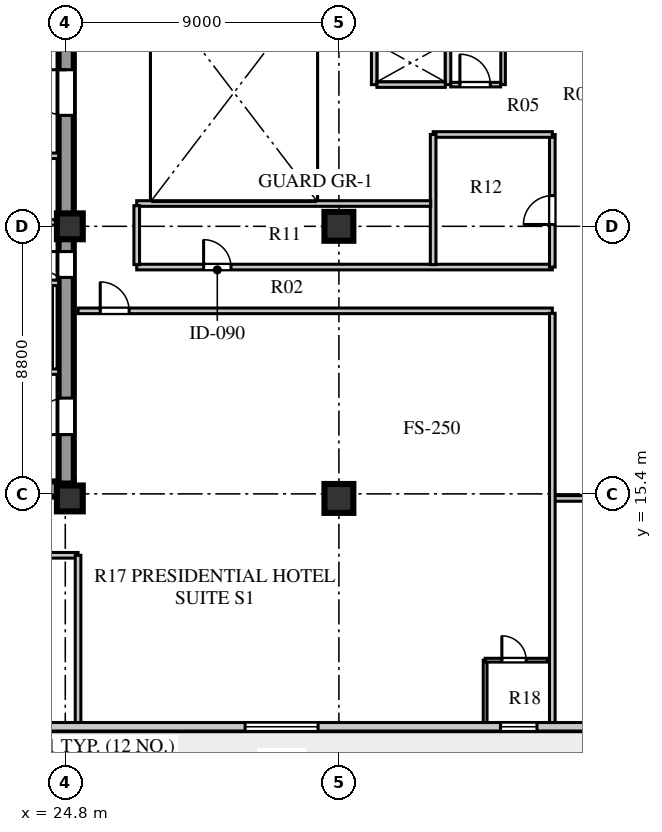
"""IFC4 building model, lengths in metres.
Left out: names, types, materials, properties, quantities, classifications, styles, units other than length and angle.
Written with IfcOpenShell. Run it as: python <this file> out.ifc"""

import sys

from ifc_helpers import new_model, si_unit, direction, frame, frame_2d, origin, origin_2d, place, context, subcontext, project, spatial, rectangle, extrude, element, fill, save


model = new_model("IFC4")
c1 = context("Model", 3, precision=1e-05, world=origin(), true_north=direction((0.0, 1.0)))
c2 = subcontext(c1, "Body", "Model", "MODEL_VIEW")
j1 = project(units=[si_unit("LENGTHUNIT", "METRE"), si_unit("PLANEANGLEUNIT", "RADIAN")], contexts=[c1])
p1 = place(None, origin())
s1 = spatial("IfcSite", under=j1, at=p1, CompositionType="ELEMENT")
p2 = place(p1, origin())
s2 = spatial("IfcBuilding", under=s1, at=p2, CompositionType="ELEMENT")
p3 = place(p2, frame((0.0, 0.0, 157.9)))
s3 = spatial("IfcBuildingStorey", under=s2, at=p3, CompositionType="ELEMENT", Elevation=157.9)
p4 = place(p3, frame((15.4, 15.56, 0.0), z_axis=(0.0, 0.0, 1.0), x_axis=(1.0, 0.0, 0.0)))
e1 = element("IfcWall", 1, at=p4, inside=s3, PredefinedType="SHEAR", context=c2, shape_type="SweptSolid", body=[
    extrude(rectangle(XDim=9.68, YDim=0.5, at=frame_2d((4.84, 0.0))), origin(), (0.0, 0.0, 1.0), 3.6),
])
p5 = place(p3, frame((24.83, 15.74, 0.0), z_axis=(0.0, 0.0, 1.0), x_axis=(0.0, 1.0, 0.0)))
e2 = element("IfcWall", 2, at=p5, inside=s3, PredefinedType="SHEAR", context=c2, shape_type="SweptSolid", body=[
    extrude(rectangle(XDim=25.76, YDim=0.5, at=frame_2d((12.88, 0.0))), origin(), (0.0, 0.0, 1.0), 3.6),
])
p6 = place(p5, frame((1.61, 0.0, 0.0)))
e3 = element("IfcOpeningElement", 3, at=p6, cuts=e2, PredefinedType="OPENING", context=c2, shape_type="SweptSolid", body=[
    extrude(rectangle(XDim=1.2, YDim=2.1, at=frame_2d((0.6, 1.05))), frame((0.0, 0.26, 0.0), z_axis=(0.0, -1.0, 0.0), x_axis=(1.0, 0.0, 0.0)), (0.0, 0.0, 1.0), 0.52),
])
p7 = place(p5, frame((6.78, 0.0, 0.0)))
e4 = element("IfcOpeningElement", 4, at=p7, cuts=e2, PredefinedType="OPENING", context=c2, shape_type="SweptSolid", body=[
    extrude(rectangle(XDim=0.85, YDim=2.06, at=frame_2d((0.425, 1.03))), frame((0.0, 0.26, 0.0), z_axis=(0.0, -1.0, 0.0), x_axis=(1.0, 0.0, 0.0)), (0.0, 0.0, 1.0), 0.52),
])
p8 = place(p5, frame((12.11, 0.0, 0.0)))
e5 = element("IfcOpeningElement", 5, at=p8, cuts=e2, PredefinedType="OPENING", context=c2, shape_type="SweptSolid", body=[
    extrude(rectangle(XDim=1.5, YDim=2.12, at=frame_2d((0.75, 1.06))), frame((0.0, 0.26, 0.0), z_axis=(0.0, -1.0, 0.0), x_axis=(1.0, 0.0, 0.0)), (0.0, 0.0, 1.0), 0.52),
])
p9 = place(p5, frame((20.11, 0.0, 0.0)))
e6 = element("IfcOpeningElement", 6, at=p9, cuts=e2, PredefinedType="OPENING", context=c2, shape_type="SweptSolid", body=[
    extrude(rectangle(XDim=1.2, YDim=2.12, at=frame_2d((0.6, 1.06))), frame((0.0, 0.26, 0.0), z_axis=(0.0, -1.0, 0.0), x_axis=(1.0, 0.0, 0.0)), (0.0, 0.0, 1.0), 0.52),
])
p10 = place(p5, frame((24.01, 0.0, 0.0)))
e7 = element("IfcOpeningElement", 7, at=p10, cuts=e2, PredefinedType="OPENING", context=c2, shape_type="SweptSolid", body=[
    extrude(rectangle(XDim=0.95, YDim=2.1, at=frame_2d((0.475, 1.05))), frame((0.0, 0.26, 0.0), z_axis=(0.0, -1.0, 0.0), x_axis=(1.0, 0.0, 0.0)), (0.0, 0.0, 1.0), 0.52),
])
for number, where, z_axis, x_axis in (
    (8, (24.95, 15.25, 0.0), (0.0, 0.0, 1.0), (1.0, 0.0, 0.0)),
    (9, (24.95, 24.2, 0.0), (0.0, 0.0, 1.0), (1.0, 0.0, 0.0)),
):
    element("IfcColumn", number, at=place(p3, frame(where, z_axis=z_axis, x_axis=x_axis)), inside=s3, PredefinedType="COLUMN", context=c2, shape_type="SweptSolid", body=[
        extrude(rectangle(XDim=0.85, YDim=0.85, at=origin_2d()), origin(), (0.0, 0.0, 1.0), 3.6),
    ])
for number, where, z_axis, x_axis in (
    (10, (33.8, 15.25, 0.0), (0.0, 0.0, 1.0), (1.0, 0.0, 0.0)),
    (11, (33.8, 24.2, 0.0), (0.0, 0.0, 1.0), (1.0, 0.0, 0.0)),
):
    element("IfcColumn", number, at=place(p3, frame(where, z_axis=z_axis, x_axis=x_axis)), inside=s3, PredefinedType="COLUMN", context=c2, shape_type="SweptSolid", body=[
        extrude(rectangle(XDim=0.95, YDim=0.95, at=origin_2d()), origin(), (0.0, 0.0, 1.0), 3.6),
    ])
p11 = place(p3, frame((13.05, 7.74, 0.0), z_axis=(0.0, 0.0, 1.0), x_axis=(1.0, 0.0, 0.0)))
e12 = element("IfcWall", 12, at=p11, inside=s3, PredefinedType="STANDARD", context=c2, shape_type="SweptSolid", body=[
    extrude(rectangle(XDim=32.5, YDim=0.28, at=frame_2d((16.25, 0.0))), origin(), (0.0, 0.0, 1.0), 3.6),
])
p12 = place(p11, frame((0.95, 0.0, 0.0)))
e13 = element("IfcOpeningElement", 13, at=p12, cuts=e12, PredefinedType="OPENING", context=c2, shape_type="SweptSolid", body=[
    extrude(rectangle(XDim=1.0, YDim=2.05, at=frame_2d((0.5, 1.025))), frame((0.0, 0.15, 0.0), z_axis=(0.0, -1.0, 0.0), x_axis=(1.0, 0.0, 0.0)), (0.0, 0.0, 1.0), 0.3),
])
p13 = place(p11, frame((6.43, 0.0, 0.8)))
e14 = element("IfcOpeningElement", 14, at=p13, cuts=e12, PredefinedType="OPENING", context=c2, shape_type="SweptSolid", body=[
    extrude(rectangle(XDim=1.2, YDim=1.75, at=frame_2d((0.6, 0.875))), frame((0.0, 0.15, 0.0), z_axis=(0.0, -1.0, 0.0), x_axis=(1.0, 0.0, 0.0)), (0.0, 0.0, 1.0), 0.3),
])
p14 = place(p11, frame((17.665, 0.0, 0.8)))
e15 = element("IfcOpeningElement", 15, at=p14, cuts=e12, PredefinedType="OPENING", context=c2, shape_type="SweptSolid", body=[
    extrude(rectangle(XDim=2.4, YDim=2.05, at=frame_2d((1.2, 1.025))), frame((0.0, 0.15, 0.0), z_axis=(0.0, -1.0, 0.0), x_axis=(1.0, 0.0, 0.0)), (0.0, 0.0, 1.0), 0.3),
])
p15 = place(p11, frame((26.065, 0.0, 0.8)))
e16 = element("IfcOpeningElement", 16, at=p15, cuts=e12, PredefinedType="OPENING", context=c2, shape_type="SweptSolid", body=[
    extrude(rectangle(XDim=1.2, YDim=1.75, at=frame_2d((0.6, 0.875))), frame((0.0, 0.15, 0.0), z_axis=(0.0, -1.0, 0.0), x_axis=(1.0, 0.0, 0.0)), (0.0, 0.0, 1.0), 0.3),
])
p16 = place(p11, frame((29.405, 0.0, 0.8)))
e17 = element("IfcOpeningElement", 17, at=p16, cuts=e12, PredefinedType="OPENING", context=c2, shape_type="SweptSolid", body=[
    extrude(rectangle(XDim=1.35, YDim=1.9, at=frame_2d((0.675, 0.95))), frame((0.0, 0.15, 0.0), z_axis=(0.0, -1.0, 0.0), x_axis=(1.0, 0.0, 0.0)), (0.0, 0.0, 1.0), 0.3),
])
p17 = place(p3, frame((19.64, 19.42, 0.0), z_axis=(0.0, 0.0, 1.0), x_axis=(1.0, 0.0, 0.0)))
e18 = element("IfcWall", 18, at=p17, inside=s3, PredefinedType="SOLIDWALL", context=c2, shape_type="SweptSolid", body=[
    extrude(rectangle(XDim=4.94, YDim=0.18, at=frame_2d((2.47, 0.0))), origin(), (0.0, 0.0, 1.0), 3.6),
])
p18 = place(p17, frame((0.72, 0.0, 0.0)))
e19 = element("IfcOpeningElement", 19, at=p18, cuts=e18, PredefinedType="OPENING", context=c2, shape_type="SweptSolid", body=[
    extrude(rectangle(XDim=1.1, YDim=2.1, at=frame_2d((0.55, 1.05))), frame((0.0, 0.1, 0.0), z_axis=(0.0, -1.0, 0.0), x_axis=(1.0, 0.0, 0.0)), (0.0, 0.0, 1.0), 0.2),
])
p19 = place(p17, frame((3.02, 0.0, 0.0)))
e20 = element("IfcOpeningElement", 20, at=p19, cuts=e18, PredefinedType="OPENING", context=c2, shape_type="SweptSolid", body=[
    extrude(rectangle(XDim=1.1, YDim=2.1, at=frame_2d((0.55, 1.05))), frame((0.0, 0.1, 0.0), z_axis=(0.0, -1.0, 0.0), x_axis=(1.0, 0.0, 0.0)), (0.0, 0.0, 1.0), 0.2),
])
p20 = place(p3, frame((19.64, 22.34, 0.0), z_axis=(0.0, 0.0, 1.0), x_axis=(1.0, 0.0, 0.0)))
e21 = element("IfcWall", 21, at=p20, inside=s3, PredefinedType="SOLIDWALL", context=c2, shape_type="SweptSolid", body=[
    extrude(rectangle(XDim=4.94, YDim=0.18, at=frame_2d((2.47, 0.0))), origin(), (0.0, 0.0, 1.0), 3.6),
])
p21 = place(p3, frame((15.9, 26.52, 0.0), z_axis=(0.0, 0.0, 1.0), x_axis=(1.0, 0.0, 0.0)))
e22 = element("IfcWall", 22, at=p21, inside=s3, PredefinedType="SOLIDWALL", context=c2, shape_type="SweptSolid", body=[
    extrude(rectangle(XDim=8.68, YDim=0.18, at=frame_2d((4.34, 0.0))), origin(), (0.0, 0.0, 1.0), 3.6),
])
p22 = place(p21, frame((2.05, 0.0, 0.0)))
e23 = element("IfcOpeningElement", 23, at=p22, cuts=e22, PredefinedType="OPENING", context=c2, shape_type="SweptSolid", body=[
    extrude(rectangle(XDim=0.85, YDim=2.06, at=frame_2d((0.425, 1.03))), frame((0.0, 0.1, 0.0), z_axis=(0.0, -1.0, 0.0), x_axis=(1.0, 0.0, 0.0)), (0.0, 0.0, 1.0), 0.2),
])
p23 = place(p21, frame((5.2, 0.0, 0.0)))
e24 = element("IfcOpeningElement", 24, at=p23, cuts=e22, PredefinedType="OPENING", context=c2, shape_type="SweptSolid", body=[
    extrude(rectangle(XDim=0.95, YDim=2.1, at=frame_2d((0.475, 1.05))), frame((0.0, 0.1, 0.0), z_axis=(0.0, -1.0, 0.0), x_axis=(1.0, 0.0, 0.0)), (0.0, 0.0, 1.0), 0.2),
])
p24 = place(p3, frame((15.9, 24.33, 0.0), z_axis=(0.0, 0.0, 1.0), x_axis=(1.0, 0.0, 0.0)))
e25 = element("IfcWall", 25, at=p24, inside=s3, PredefinedType="SOLIDWALL", context=c2, shape_type="SweptSolid", body=[
    extrude(rectangle(XDim=8.68, YDim=0.18, at=frame_2d((4.34, 0.0))), origin(), (0.0, 0.0, 1.0), 2.95),
])
p25 = place(p3, frame((34.96, 28.86, 0.0), z_axis=(0.0, 0.0, 1.0), x_axis=(0.0, 1.0, 0.0)))
e26 = element("IfcWall", 26, at=p25, inside=s3, PredefinedType="SOLIDWALL", context=c2, shape_type="SweptSolid", body=[
    extrude(rectangle(XDim=4.22, YDim=0.18, at=frame_2d((2.11, 0.0))), origin(), (0.0, 0.0, 1.0), 3.6),
])
p26 = place(p3, frame((37.39, 28.86, 0.0), z_axis=(0.0, 0.0, 1.0), x_axis=(0.0, 1.0, 0.0)))
e27 = element("IfcWall", 27, at=p26, inside=s3, PredefinedType="SOLIDWALL", context=c2, shape_type="SweptSolid", body=[
    extrude(rectangle(XDim=4.22, YDim=0.18, at=frame_2d((2.11, 0.0))), origin(), (0.0, 0.0, 1.0), 3.6),
])
p27 = place(p26, frame((2.1, 0.0, 0.0)))
e28 = element("IfcOpeningElement", 28, at=p27, cuts=e27, PredefinedType="OPENING", context=c2, shape_type="SweptSolid", body=[
    extrude(rectangle(XDim=1.2, YDim=2.12, at=frame_2d((0.6, 1.06))), frame((0.0, 0.1, 0.0), z_axis=(0.0, -1.0, 0.0), x_axis=(1.0, 0.0, 0.0)), (0.0, 0.0, 1.0), 0.2),
])
p28 = place(p3, frame((35.05, 28.86, 0.0), z_axis=(0.0, 0.0, 1.0), x_axis=(1.0, 0.0, 0.0)))
e29 = element("IfcWall", 29, at=p28, inside=s3, PredefinedType="SOLIDWALL", context=c2, shape_type="SweptSolid", body=[
    extrude(rectangle(XDim=2.25, YDim=0.18, at=frame_2d((1.125, 0.0))), origin(), (0.0, 0.0, 1.0), 3.6),
])
p29 = place(p3, frame((39.2, 28.86, 0.0), z_axis=(0.0, 0.0, 1.0), x_axis=(0.0, 1.0, 0.0)))
e30 = element("IfcWall", 30, at=p29, inside=s3, PredefinedType="PARTITIONING", context=c2, shape_type="SweptSolid", body=[
    extrude(rectangle(XDim=4.22, YDim=0.15, at=frame_2d((2.11, 0.0))), origin(), (0.0, 0.0, 1.0), 3.6),
])
p30 = place(p3, frame((37.48, 28.86, 0.0), z_axis=(0.0, 0.0, 1.0), x_axis=(1.0, 0.0, 0.0)))
e31 = element("IfcWall", 31, at=p30, inside=s3, PredefinedType="PARTITIONING", context=c2, shape_type="SweptSolid", body=[
    extrude(rectangle(XDim=1.64, YDim=0.15, at=frame_2d((0.82, 0.0))), origin(), (0.0, 0.0, 1.0), 3.6),
])
p31 = place(p30, frame((0.3, 0.0, 0.0)))
e32 = element("IfcOpeningElement", 32, at=p31, cuts=e31, PredefinedType="OPENING", context=c2, shape_type="SweptSolid", body=[
    extrude(rectangle(XDim=1.0, YDim=2.1, at=frame_2d((0.5, 1.05))), frame((0.0, 0.085, 0.0), z_axis=(0.0, -1.0, 0.0), x_axis=(1.0, 0.0, 0.0)), (0.0, 0.0, 1.0), 0.17),
])
p32 = place(p3, frame((25.22, 21.42, 0.0), z_axis=(0.0, 0.0, 1.0), x_axis=(1.0, 0.0, 0.0)))
e33 = element("IfcWall", 33, at=p32, inside=s3, PredefinedType="SOLIDWALL", context=c2, shape_type="SweptSolid", body=[
    extrude(rectangle(XDim=15.6, YDim=0.185, at=frame_2d((7.8, 0.0))), origin(), (0.0, 0.0, 1.0), 3.25),
])
p33 = place(p32, frame((0.73, 0.0, 0.0)))
e34 = element("IfcOpeningElement", 34, at=p33, cuts=e33, PredefinedType="OPENING", context=c2, shape_type="SweptSolid", body=[
    extrude(rectangle(XDim=0.95, YDim=2.1, at=frame_2d((0.475, 1.05))), frame((0.0, 0.103, 0.0), z_axis=(0.0, -1.0, 0.0), x_axis=(1.0, 0.0, 0.0)), (0.0, 0.0, 1.0), 0.205),
])
p34 = place(p3, frame((27.15, 22.86, 0.0), z_axis=(0.0, 0.0, 1.0), x_axis=(1.0, 0.0, 0.0)))
e35 = element("IfcWall", 35, at=p34, inside=s3, PredefinedType="SOLIDWALL", context=c2, shape_type="SweptSolid", body=[
    extrude(rectangle(XDim=13.67, YDim=0.185, at=frame_2d((6.835, 0.0))), origin(), (0.0, 0.0, 1.0), 3.6),
])
p35 = place(p34, frame((2.2, 0.0, 0.0)))
e36 = element("IfcOpeningElement", 36, at=p35, cuts=e35, PredefinedType="OPENING", context=c2, shape_type="SweptSolid", body=[
    extrude(rectangle(XDim=0.9, YDim=2.08, at=frame_2d((0.45, 1.04))), frame((0.0, 0.103, 0.0), z_axis=(0.0, -1.0, 0.0), x_axis=(1.0, 0.0, 0.0)), (0.0, 0.0, 1.0), 0.205),
])
p36 = place(p3, frame((40.82, 15.25, 0.0), z_axis=(0.0, 0.0, 1.0), x_axis=(1.0, 0.0, 0.0)))
e37 = element("IfcWall", 37, at=p36, inside=s3, PredefinedType="SOLIDWALL", context=c2, shape_type="SweptSolid", body=[
    extrude(rectangle(XDim=9.7, YDim=0.185, at=frame_2d((4.85, 0.0))), origin(), (0.0, 0.0, 1.0), 2.95),
])
p37 = place(p3, frame((40.82, 22.86, 0.0), z_axis=(0.0, 0.0, 1.0), x_axis=(0.0, 1.0, 0.0)))
e38 = element("IfcWall", 38, at=p37, inside=s3, PredefinedType="SOLIDWALL", context=c2, shape_type="SweptSolid", body=[
    extrude(rectangle(XDim=4.36, YDim=0.185, at=frame_2d((2.18, 0.0))), origin(), (0.0, 0.0, 1.0), 3.6),
])
p38 = place(p37, frame((1.4, 0.0, 0.0)))
e39 = element("IfcOpeningElement", 39, at=p38, cuts=e38, PredefinedType="OPENING", context=c2, shape_type="SweptSolid", body=[
    extrude(rectangle(XDim=0.95, YDim=2.1, at=frame_2d((0.475, 1.05))), frame((0.0, 0.103, 0.0), z_axis=(0.0, -1.0, 0.0), x_axis=(1.0, 0.0, 0.0)), (0.0, 0.0, 1.0), 0.205),
])
p39 = place(p3, frame((13.39, 13.38, 0.0), z_axis=(0.0, 0.0, 1.0), x_axis=(1.0, 0.0, 0.0)))
e40 = element("IfcWall", 40, at=p39, inside=s3, PredefinedType="SOLIDWALL", context=c2, shape_type="SweptSolid", body=[
    extrude(rectangle(XDim=11.83, YDim=0.185, at=frame_2d((5.915, 0.0))), origin(), (0.0, 0.0, 1.0), 3.6),
])
p40 = place(p39, frame((4.76, 0.0, 0.0)))
e41 = element("IfcOpeningElement", 41, at=p40, cuts=e40, PredefinedType="OPENING", context=c2, shape_type="SweptSolid", body=[
    extrude(rectangle(XDim=1.0, YDim=2.08, at=frame_2d((0.5, 1.04))), frame((0.0, 0.103, 0.0), z_axis=(0.0, -1.0, 0.0), x_axis=(1.0, 0.0, 0.0)), (0.0, 0.0, 1.0), 0.205),
])
p41 = place(p3, frame((25.22, 7.88, 0.0), z_axis=(0.0, 0.0, 1.0), x_axis=(0.0, 1.0, 0.0)))
e42 = element("IfcWall", 42, at=p41, inside=s3, PredefinedType="SOLIDWALL", context=c2, shape_type="SweptSolid", body=[
    extrude(rectangle(XDim=5.5, YDim=0.185, at=frame_2d((2.75, 0.0))), origin(), (0.0, 0.0, 1.0), 3.15),
])
p42 = place(p3, frame((36.9, 27.22, 0.0), z_axis=(0.0, 0.0, 1.0), x_axis=(1.0, 0.0, 0.0)))
e43 = element("IfcWall", 43, at=p42, inside=s3, PredefinedType="SOLIDWALL", context=c2, shape_type="SweptSolid", body=[
    extrude(rectangle(XDim=3.92, YDim=0.185, at=frame_2d((1.96, 0.0))), origin(), (0.0, 0.0, 1.0), 3.25),
])
p43 = place(p3, frame((36.9, 22.94, 0.0), z_axis=(0.0, 0.0, 1.0), x_axis=(0.0, 1.0, 0.0)))
e44 = element("IfcWall", 44, at=p43, inside=s3, PredefinedType="SOLIDWALL", context=c2, shape_type="SweptSolid", body=[
    extrude(rectangle(XDim=4.28, YDim=0.185, at=frame_2d((2.14, 0.0))), origin(), (0.0, 0.0, 1.0), 3.6),
])
p44 = place(p3, frame((27.15, 24.95, 0.0), z_axis=(0.0, 0.0, 1.0), x_axis=(1.0, 0.0, 0.0)))
e45 = element("IfcWall", 45, at=p44, inside=s3, PredefinedType="SOLIDWALL", context=c2, shape_type="SweptSolid", body=[
    extrude(rectangle(XDim=9.67, YDim=0.185, at=frame_2d((4.835, 0.0))), origin(), (0.0, 0.0, 1.0), 3.05),
])
p45 = place(p3, frame((27.15, 22.94, 0.0), z_axis=(0.0, 0.0, 1.0), x_axis=(0.0, 1.0, 0.0)))
e46 = element("IfcWall", 46, at=p45, inside=s3, PredefinedType="SOLIDWALL", context=c2, shape_type="SweptSolid", body=[
    extrude(rectangle(XDim=1.94, YDim=0.185, at=frame_2d((0.97, 0.0))), origin(), (0.0, 0.0, 1.0), 3.6),
])
p46 = place(p3, frame((40.82, 7.88, 0.0), z_axis=(0.0, 0.0, 1.0), x_axis=(0.0, 1.0, 0.0)))
e47 = element("IfcWall", 47, at=p46, inside=s3, PredefinedType="SOLIDWALL", context=c2, shape_type="SweptSolid", body=[
    extrude(rectangle(XDim=13.46, YDim=0.185, at=frame_2d((6.73, 0.0))), origin(), (0.0, 0.0, 1.0), 3.6),
])
p47 = place(p3, frame((38.61, 7.88, 0.0), z_axis=(0.0, 0.0, 1.0), x_axis=(0.0, 1.0, 0.0)))
e48 = element("IfcWall", 48, at=p47, inside=s3, PredefinedType="PLUMBINGWALL", context=c2, shape_type="SweptSolid", body=[
    extrude(rectangle(XDim=2.05, YDim=0.125, at=frame_2d((1.025, 0.0))), origin(), (0.0, 0.0, 1.0), 3.6),
])
p48 = place(p3, frame((38.61, 9.93, 0.0), z_axis=(0.0, 0.0, 1.0), x_axis=(1.0, 0.0, 0.0)))
e49 = element("IfcWall", 49, at=p48, inside=s3, PredefinedType="PLUMBINGWALL", context=c2, shape_type="SweptSolid", body=[
    extrude(rectangle(XDim=2.05, YDim=0.125, at=frame_2d((1.025, 0.0))), origin(), (0.0, 0.0, 1.0), 3.6),
])
p49 = place(p48, frame((0.55, 0.0, 0.0)))
e50 = element("IfcOpeningElement", 50, at=p49, cuts=e49, PredefinedType="OPENING", context=c2, shape_type="SweptSolid", body=[
    extrude(rectangle(XDim=0.8, YDim=2.05, at=frame_2d((0.4, 1.025))), frame((0.0, 0.073, 0.0), z_axis=(0.0, -1.0, 0.0), x_axis=(1.0, 0.0, 0.0)), (0.0, 0.0, 1.0), 0.145),
])
p50 = place(p14, origin())
e51 = element("IfcWindow", 51, at=p50, inside=s3, PartitioningType="SINGLE_PANEL", PredefinedType="WINDOW", context=c2, shape_type="SweptSolid", body=[
    extrude(rectangle(XDim=2.4, YDim=2.05, at=frame_2d((1.2, 1.025))), frame((0.0, 0.03, 0.0), z_axis=(0.0, -1.0, 0.0), x_axis=(1.0, 0.0, 0.0)), (0.0, 0.0, 1.0), 0.06),
])
fill(e15, e51)
p51 = place(p15, origin())
e52 = element("IfcWindow", 52, at=p51, inside=s3, PartitioningType="SINGLE_PANEL", PredefinedType="WINDOW", context=c2, shape_type="SweptSolid", body=[
    extrude(rectangle(XDim=1.2, YDim=1.75, at=frame_2d((0.6, 0.875))), frame((0.0, 0.03, 0.0), z_axis=(0.0, -1.0, 0.0), x_axis=(1.0, 0.0, 0.0)), (0.0, 0.0, 1.0), 0.06),
])
fill(e16, e52)
p52 = place(p6, frame((1.2, 0.0, 0.0), z_axis=(0.0, 0.0, 1.0), x_axis=(-1.0, 0.0, 0.0)))
e53 = element("IfcDoor", 53, at=p52, inside=s3, OperationType="SINGLE_SWING_RIGHT", PredefinedType="DOOR", context=c2, shape_type="SweptSolid", body=[
    extrude(rectangle(XDim=1.2, YDim=2.1, at=frame_2d((0.6, 1.05))), frame((0.0, 0.025, 0.0), z_axis=(0.0, -1.0, 0.0), x_axis=(1.0, 0.0, 0.0)), (0.0, 0.0, 1.0), 0.05),
])
fill(e3, e53)
p53 = place(p7, frame((0.85, 0.0, 0.0), z_axis=(0.0, 0.0, 1.0), x_axis=(-1.0, 0.0, 0.0)))
e54 = element("IfcDoor", 54, at=p53, inside=s3, OperationType="SINGLE_SWING_LEFT", PredefinedType="DOOR", context=c2, shape_type="SweptSolid", body=[
    extrude(rectangle(XDim=0.85, YDim=2.06, at=frame_2d((0.425, 1.03))), frame((0.0, 0.025, 0.0), z_axis=(0.0, -1.0, 0.0), x_axis=(1.0, 0.0, 0.0)), (0.0, 0.0, 1.0), 0.05),
])
fill(e4, e54)
p54 = place(p8, frame((1.5, 0.0, 0.0), z_axis=(0.0, 0.0, 1.0), x_axis=(-1.0, 0.0, 0.0)))
e55 = element("IfcDoor", 55, at=p54, inside=s3, OperationType="SINGLE_SWING_LEFT", PredefinedType="DOOR", context=c2, shape_type="SweptSolid", body=[
    extrude(rectangle(XDim=1.5, YDim=2.12, at=frame_2d((0.75, 1.06))), frame((0.0, 0.025, 0.0), z_axis=(0.0, -1.0, 0.0), x_axis=(1.0, 0.0, 0.0)), (0.0, 0.0, 1.0), 0.05),
])
fill(e5, e55)
p55 = place(p31, origin())
e56 = element("IfcDoor", 56, at=p55, inside=s3, OperationType="SINGLE_SWING_LEFT", PredefinedType="DOOR", context=c2, shape_type="SweptSolid", body=[
    extrude(rectangle(XDim=1.0, YDim=2.1, at=frame_2d((0.5, 1.05))), frame((0.0, 0.025, 0.0), z_axis=(0.0, -1.0, 0.0), x_axis=(1.0, 0.0, 0.0)), (0.0, 0.0, 1.0), 0.05),
])
fill(e32, e56)
p56 = place(p35, origin())
e57 = element("IfcDoor", 57, at=p56, inside=s3, OperationType="SINGLE_SWING_LEFT", PredefinedType="DOOR", context=c2, shape_type="SweptSolid", body=[
    extrude(rectangle(XDim=0.9, YDim=2.08, at=frame_2d((0.45, 1.04))), frame((0.0, 0.025, 0.0), z_axis=(0.0, -1.0, 0.0), x_axis=(1.0, 0.0, 0.0)), (0.0, 0.0, 1.0), 0.05),
])
fill(e36, e57)
p57 = place(p38, frame((0.95, 0.0, 0.0), z_axis=(0.0, 0.0, 1.0), x_axis=(-1.0, 0.0, 0.0)))
e58 = element("IfcDoor", 58, at=p57, inside=s3, OperationType="SINGLE_SWING_RIGHT", PredefinedType="DOOR", context=c2, shape_type="SweptSolid", body=[
    extrude(rectangle(XDim=0.95, YDim=2.1, at=frame_2d((0.475, 1.05))), frame((0.0, 0.025, 0.0), z_axis=(0.0, -1.0, 0.0), x_axis=(1.0, 0.0, 0.0)), (0.0, 0.0, 1.0), 0.05),
])
fill(e39, e58)
p58 = place(p33, frame((0.95, 0.0, 0.0), z_axis=(0.0, 0.0, 1.0), x_axis=(-1.0, 0.0, 0.0)))
e59 = element("IfcDoor", 59, at=p58, inside=s3, OperationType="SINGLE_SWING_RIGHT", PredefinedType="DOOR", context=c2, shape_type="SweptSolid", body=[
    extrude(rectangle(XDim=0.95, YDim=2.1, at=frame_2d((0.475, 1.05))), frame((0.0, 0.025, 0.0), z_axis=(0.0, -1.0, 0.0), x_axis=(1.0, 0.0, 0.0)), (0.0, 0.0, 1.0), 0.05),
])
fill(e34, e59)
p59 = place(p49, origin())
e60 = element("IfcDoor", 60, at=p59, inside=s3, OperationType="SINGLE_SWING_LEFT", PredefinedType="DOOR", context=c2, shape_type="SweptSolid", body=[
    extrude(rectangle(XDim=0.8, YDim=2.05, at=frame_2d((0.4, 1.025))), frame((0.0, 0.025, 0.0), z_axis=(0.0, -1.0, 0.0), x_axis=(1.0, 0.0, 0.0)), (0.0, 0.0, 1.0), 0.05),
])
fill(e50, e60)
save(model, sys.argv[1])
